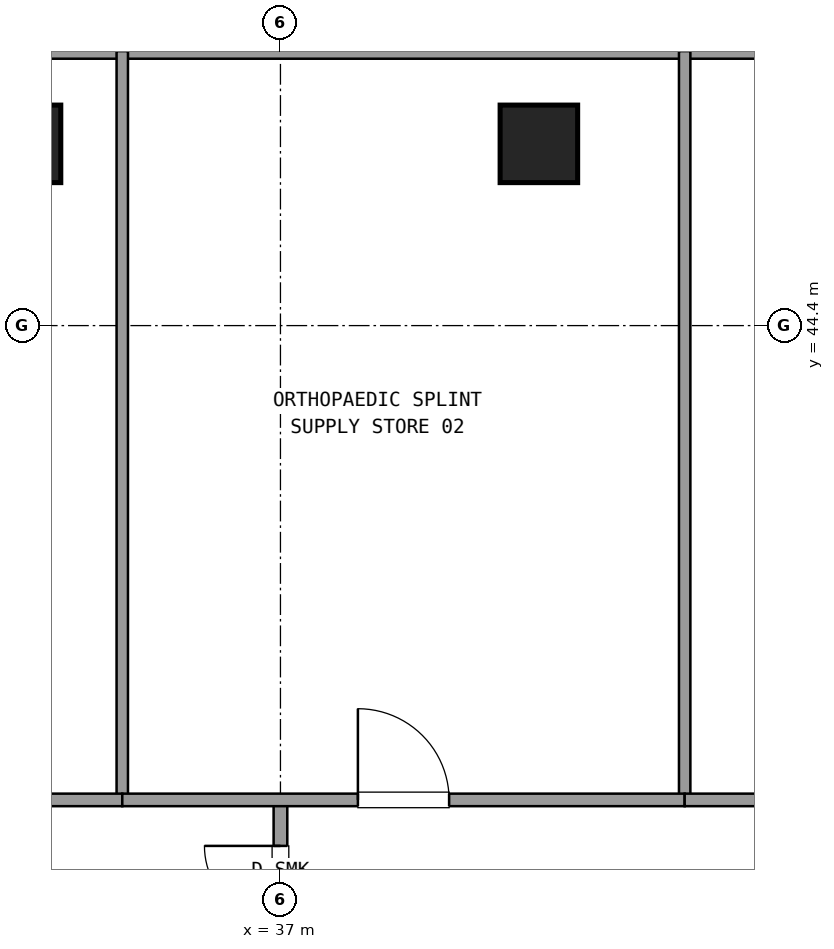
"""IFC4 building model, lengths in metres.
Left out: names, types, materials, properties, quantities, classifications, styles, units other than length and angle.
Written with IfcOpenShell. Run it as: python <this file> out.ifc"""

import sys

from ifc_helpers import new_model, si_unit, direction, frame, frame_2d, origin, origin_2d, place, context, subcontext, project, spatial, rectangle, extrude, element, fill, save


model = new_model("IFC4")
c1 = context("Model", 3, precision=1e-05, world=origin(), true_north=direction((0.0, 1.0)))
c2 = subcontext(c1, "Body", "Model", "MODEL_VIEW")
j1 = project(units=[si_unit("LENGTHUNIT", "METRE"), si_unit("PLANEANGLEUNIT", "RADIAN")], contexts=[c1])
p1 = place(None, origin())
s1 = spatial("IfcSite", under=j1, at=p1, CompositionType="ELEMENT")
p2 = place(p1, origin())
s2 = spatial("IfcBuilding", under=s1, at=p2, CompositionType="ELEMENT")
p3 = place(p2, frame((0.0, 0.0, 91.98)))
s3 = spatial("IfcBuildingStorey", under=s2, at=p3, CompositionType="ELEMENT", Elevation=91.98)
for number, where, z_axis, x_axis in (
    (1, (40.4, 46.791, 0.021), (0.0, -0.025, 1.0), (1.0, 0.0, 0.0)),
    (2, (33.6, 46.791, 0.021), (0.0, -0.025, 1.0), (1.0, 0.0, 0.0)),
):
    element("IfcColumn", number, at=place(p3, frame(where, z_axis=z_axis, x_axis=x_axis)), inside=s3, PredefinedType="COLUMN", context=c2, shape_type="SweptSolid", body=[
        extrude(rectangle(XDim=1.02, YDim=1.02, at=origin_2d()), origin(), (0.0, 0.0, 1.0), 3.559),
    ])
p4 = place(p3, frame((57.442, 48.031, 0.0), z_axis=(0.0, 0.0, 1.0), x_axis=(-1.0, 0.0, 0.0)))
e3 = element("IfcWall", 3, at=p4, inside=s3, PredefinedType="SOLIDWALL", context=c2, shape_type="SweptSolid", body=[
    extrude(rectangle(XDim=40.884, YDim=0.24, at=frame_2d((20.442, 0.0))), origin(), (0.0, 0.0, 1.0), 0.85),
])
p5 = place(p3, frame((37.0, 34.95, 0.0), z_axis=(0.0, 0.0, 1.0), x_axis=(0.0, 1.0, 0.0)))
e4 = element("IfcWall", 4, at=p5, inside=s3, PredefinedType="PARTITIONING", context=c2, shape_type="SweptSolid", body=[
    extrude(rectangle(XDim=3.21, YDim=0.18, at=frame_2d((1.605, 0.0))), origin(), (0.0, 0.0, 1.0), 2.61),
])
p6 = place(p5, frame((0.605, 0.0, 0.0)))
e5 = element("IfcOpeningElement", 5, at=p6, cuts=e4, PredefinedType="OPENING", context=c2, shape_type="SweptSolid", body=[
    extrude(rectangle(XDim=2.0, YDim=2.2, at=frame_2d((1.0, 1.1))), frame((0.0, 0.1, 0.0), z_axis=(0.0, -1.0, 0.0), x_axis=(1.0, 0.0, 0.0)), (0.0, 0.0, 1.0), 0.2),
])
p7 = place(p3, frame((34.919, 38.16, 0.0), z_axis=(0.0, 0.0, 1.0), x_axis=(0.0, 1.0, 0.0)))
e6 = element("IfcWall", 6, at=p7, inside=s3, PredefinedType="PARTITIONING", context=c2, shape_type="SweptSolid", body=[
    extrude(rectangle(XDim=9.851, YDim=0.15, at=frame_2d((4.926, 0.0))), origin(), (0.0, 0.0, 1.0), 2.61),
])
p8 = place(p3, frame((25.43, 38.16, 0.0), z_axis=(0.0, 0.0, 1.0), x_axis=(1.0, 0.0, 0.0)))
e7 = element("IfcWall", 7, at=p8, inside=s3, PredefinedType="PARTITIONING", context=c2, shape_type="SweptSolid", body=[
    extrude(rectangle(XDim=9.489, YDim=0.165, at=frame_2d((4.745, 0.0))), origin(), (0.0, 0.0, 1.0), 2.61),
])
p9 = place(p8, frame((4.144, 0.0, 0.0)))
e8 = element("IfcOpeningElement", 8, at=p9, cuts=e7, PredefinedType="OPENING", context=c2, shape_type="SweptSolid", body=[
    extrude(rectangle(XDim=1.2, YDim=2.15, at=frame_2d((0.6, 1.075))), frame((0.0, 0.093, 0.0), z_axis=(0.0, -1.0, 0.0), x_axis=(1.0, 0.0, 0.0)), (0.0, 0.0, 1.0), 0.185),
])
p10 = place(p3, frame((42.318, 38.16, 0.0), z_axis=(0.0, 0.0, 1.0), x_axis=(0.0, 1.0, 0.0)))
e9 = element("IfcWall", 9, at=p10, inside=s3, PredefinedType="PARTITIONING", context=c2, shape_type="SweptSolid", body=[
    extrude(rectangle(XDim=9.851, YDim=0.15, at=frame_2d((4.926, 0.0))), origin(), (0.0, 0.0, 1.0), 2.61),
])
p11 = place(p3, frame((34.919, 38.16, 0.0), z_axis=(0.0, 0.0, 1.0), x_axis=(1.0, 0.0, 0.0)))
e10 = element("IfcWall", 10, at=p11, inside=s3, PredefinedType="PARTITIONING", context=c2, shape_type="SweptSolid", body=[
    extrude(rectangle(XDim=7.399, YDim=0.165, at=frame_2d((3.7, 0.0))), origin(), (0.0, 0.0, 1.0), 2.61),
])
p12 = place(p11, frame((3.1, 0.0, 0.0)))
e11 = element("IfcOpeningElement", 11, at=p12, cuts=e10, PredefinedType="OPENING", context=c2, shape_type="SweptSolid", body=[
    extrude(rectangle(XDim=1.2, YDim=2.15, at=frame_2d((0.6, 1.075))), frame((0.0, 0.093, 0.0), z_axis=(0.0, -1.0, 0.0), x_axis=(1.0, 0.0, 0.0)), (0.0, 0.0, 1.0), 0.185),
])
p13 = place(p3, frame((42.318, 38.16, 0.0), z_axis=(0.0, 0.0, 1.0), x_axis=(1.0, 0.0, 0.0)))
e12 = element("IfcWall", 12, at=p13, inside=s3, PredefinedType="PARTITIONING", context=c2, shape_type="SweptSolid", body=[
    extrude(rectangle(XDim=6.252, YDim=0.165, at=frame_2d((3.126, 0.0))), origin(), (0.0, 0.0, 1.0), 2.61),
])
p14 = place(p13, frame((2.526, 0.0, 0.0)))
e13 = element("IfcOpeningElement", 13, at=p14, cuts=e12, PredefinedType="OPENING", context=c2, shape_type="SweptSolid", body=[
    extrude(rectangle(XDim=1.2, YDim=2.15, at=frame_2d((0.6, 1.075))), frame((0.0, 0.093, 0.0), z_axis=(0.0, -1.0, 0.0), x_axis=(1.0, 0.0, 0.0)), (0.0, 0.0, 1.0), 0.185),
])
p15 = place(p6, origin())
e14 = element("IfcDoor", 14, at=p15, inside=s3, OperationType="DOUBLE_DOOR_SINGLE_SWING", PredefinedType="DOOR", context=c2, shape_type="SweptSolid", body=[
    extrude(rectangle(XDim=2.0, YDim=2.2, at=frame_2d((1.0, 1.1))), frame((0.0, 0.025, 0.0), z_axis=(0.0, -1.0, 0.0), x_axis=(1.0, 0.0, 0.0)), (0.0, 0.0, 1.0), 0.05),
])
fill(e5, e14)
p16 = place(p12, origin())
e15 = element("IfcDoor", 15, at=p16, inside=s3, OperationType="SINGLE_SWING_LEFT", PredefinedType="DOOR", context=c2, shape_type="SweptSolid", body=[
    extrude(rectangle(XDim=1.2, YDim=2.15, at=frame_2d((0.6, 1.075))), frame((0.0, 0.025, 0.0), z_axis=(0.0, -1.0, 0.0), x_axis=(1.0, 0.0, 0.0)), (0.0, 0.0, 1.0), 0.05),
])
fill(e11, e15)
save(model, sys.argv[1])
